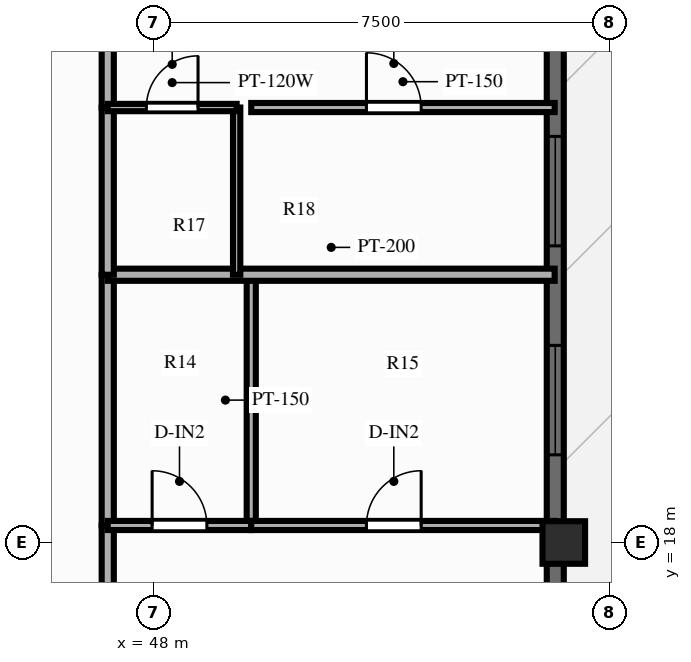
"""IFC4 building model, lengths in metres.
Left out: names, types, materials, properties, quantities, classifications, styles, units other than length and angle.
Written with IfcOpenShell. Run it as: python <this file> out.ifc"""

import sys

from ifc_helpers import new_model, si_unit, direction, frame, frame_2d, origin, origin_2d, place, context, subcontext, project, spatial, rectangle, extrude, source, transform, mapped, element, fill, save


model = new_model("IFC4")
c1 = context("Model", 3, precision=1e-05, world=origin(), true_north=direction((0.0, 1.0)))
c2 = subcontext(c1, "Body", "Model", "MODEL_VIEW")
j1 = project(units=[si_unit("LENGTHUNIT", "METRE"), si_unit("PLANEANGLEUNIT", "RADIAN")], contexts=[c1])
p1 = place(None, origin())
s1 = spatial("IfcSite", under=j1, at=p1, CompositionType="ELEMENT")
p2 = place(p1, origin())
s2 = spatial("IfcBuilding", under=s1, at=p2, CompositionType="ELEMENT")
p3 = place(p2, frame((0.0, 0.0, 226.2)))
s3 = spatial("IfcBuildingStorey", under=s2, at=p3, CompositionType="ELEMENT", Elevation=226.2)
m1 = source(origin(), c2, "Body", "SweptSolid", [
    extrude(rectangle(XDim=0.7, YDim=0.7, at=origin_2d()), origin(), (0.0, 0.0, 1.0), 3.9),
])
p4 = place(p3, frame((54.75, 18.0, 0.0), z_axis=(0.0, 0.0, 1.0), x_axis=(1.0, 0.0, 0.0)))
e1 = element("IfcColumn", 1, at=p4, inside=s3, PredefinedType="COLUMN", context=c2, shape_type="MappedRepresentation", body=[
    mapped(m1, transform((0.0, 0.0, 0.0), scale=1.0)),
])
p5 = place(p3, frame((54.61, 11.5, 0.0), z_axis=(0.0, 0.0, 1.0), x_axis=(0.0, 1.0, 0.0)))
e2 = element("IfcWall", 2, at=p5, inside=s3, PredefinedType="SOLIDWALL", context=c2, shape_type="SweptSolid", body=[
    extrude(rectangle(XDim=31.0, YDim=0.28, at=frame_2d((15.5, 0.0))), origin(), (0.0, 0.0, 1.0), 2.79),
])
p6 = place(p5, frame((0.66, 0.0, 0.85)))
e3 = element("IfcOpeningElement", 3, at=p6, cuts=e2, PredefinedType="OPENING", context=c2, shape_type="SweptSolid", body=[
    extrude(rectangle(XDim=1.8, YDim=1.65, at=frame_2d((0.9, 0.825))), frame((0.0, 0.152, 0.0), z_axis=(0.0, -1.0, 0.0), x_axis=(1.0, 0.0, 0.0)), (0.0, 0.0, 1.0), 0.304),
])
p7 = place(p5, frame((3.72, 0.0, 0.85)))
e4 = element("IfcOpeningElement", 4, at=p7, cuts=e2, PredefinedType="OPENING", context=c2, shape_type="SweptSolid", body=[
    extrude(rectangle(XDim=1.8, YDim=1.65, at=frame_2d((0.9, 0.825))), frame((0.0, 0.152, 0.0), z_axis=(0.0, -1.0, 0.0), x_axis=(1.0, 0.0, 0.0)), (0.0, 0.0, 1.0), 0.304),
])
p8 = place(p5, frame((7.942, 0.0, 0.85)))
e5 = element("IfcOpeningElement", 5, at=p8, cuts=e2, PredefinedType="OPENING", context=c2, shape_type="SweptSolid", body=[
    extrude(rectangle(XDim=1.8, YDim=1.65, at=frame_2d((0.9, 0.825))), frame((0.0, 0.152, 0.0), z_axis=(0.0, -1.0, 0.0), x_axis=(1.0, 0.0, 0.0)), (0.0, 0.0, 1.0), 0.304),
])
p9 = place(p5, frame((11.379, 0.0, 0.85)))
e6 = element("IfcOpeningElement", 6, at=p9, cuts=e2, PredefinedType="OPENING", context=c2, shape_type="SweptSolid", body=[
    extrude(rectangle(XDim=1.8, YDim=1.65, at=frame_2d((0.9, 0.825))), frame((0.0, 0.152, 0.0), z_axis=(0.0, -1.0, 0.0), x_axis=(1.0, 0.0, 0.0)), (0.0, 0.0, 1.0), 0.304),
])
p10 = place(p5, frame((16.213, 0.0, 0.0), z_axis=(0.0, 0.0, 1.0), x_axis=(-1.0, 0.0, 0.0)))
e7 = element("IfcOpeningElement", 7, at=p10, cuts=e2, PredefinedType="OPENING", context=c2, shape_type="SweptSolid", body=[
    extrude(rectangle(XDim=1.6, YDim=2.15, at=frame_2d((0.8, 1.075))), frame((0.0, 0.152, 0.0), z_axis=(0.0, -1.0, 0.0), x_axis=(1.0, 0.0, 0.0)), (0.0, 0.0, 1.0), 0.304),
])
p11 = place(p5, frame((18.194, 0.0, 0.85)))
e8 = element("IfcOpeningElement", 8, at=p11, cuts=e2, PredefinedType="OPENING", context=c2, shape_type="SweptSolid", body=[
    extrude(rectangle(XDim=1.8, YDim=1.65, at=frame_2d((0.9, 0.825))), frame((0.0, 0.152, 0.0), z_axis=(0.0, -1.0, 0.0), x_axis=(1.0, 0.0, 0.0)), (0.0, 0.0, 1.0), 0.304),
])
p12 = place(p5, frame((21.488, 0.0, 0.85)))
e9 = element("IfcOpeningElement", 9, at=p12, cuts=e2, PredefinedType="OPENING", context=c2, shape_type="SweptSolid", body=[
    extrude(rectangle(XDim=1.8, YDim=1.65, at=frame_2d((0.9, 0.825))), frame((0.0, 0.152, 0.0), z_axis=(0.0, -1.0, 0.0), x_axis=(1.0, 0.0, 0.0)), (0.0, 0.0, 1.0), 0.304),
])
p13 = place(p5, frame((25.142, 0.0, 0.85)))
e10 = element("IfcOpeningElement", 10, at=p13, cuts=e2, PredefinedType="OPENING", context=c2, shape_type="SweptSolid", body=[
    extrude(rectangle(XDim=1.5, YDim=1.65, at=frame_2d((0.75, 0.825))), frame((0.0, 0.152, 0.0), z_axis=(0.0, -1.0, 0.0), x_axis=(1.0, 0.0, 0.0)), (0.0, 0.0, 1.0), 0.304),
])
p14 = place(p5, frame((28.052, 0.0, 0.85)))
e11 = element("IfcOpeningElement", 11, at=p14, cuts=e2, PredefinedType="OPENING", context=c2, shape_type="SweptSolid", body=[
    extrude(rectangle(XDim=1.8, YDim=1.65, at=frame_2d((0.9, 0.825))), frame((0.0, 0.152, 0.0), z_axis=(0.0, -1.0, 0.0), x_axis=(1.0, 0.0, 0.0)), (0.0, 0.0, 1.0), 0.304),
])
p15 = place(p3, frame((47.25, 14.43, 0.0), z_axis=(0.0, 0.0, 1.0), x_axis=(0.0, 1.0, 0.0)))
e12 = element("IfcWall", 12, at=p15, inside=s3, PredefinedType="PARTITIONING", context=c2, shape_type="SweptSolid", body=[
    extrude(rectangle(XDim=3.85, YDim=0.2, at=frame_2d((1.925, 0.0))), origin(), (0.0, 0.0, 1.0), 3.69),
])
p16 = place(p15, frame((1.425, 0.0, 0.0)))
e13 = element("IfcOpeningElement", 13, at=p16, cuts=e12, PredefinedType="OPENING", context=c2, shape_type="SweptSolid", body=[
    extrude(rectangle(XDim=1.0, YDim=2.15, at=frame_2d((0.5, 1.075))), frame((0.0, 0.112, 0.0), z_axis=(0.0, -1.0, 0.0), x_axis=(1.0, 0.0, 0.0)), (0.0, 0.0, 1.0), 0.224),
])
p17 = place(p3, frame((47.25, 18.28, 0.0), z_axis=(0.0, 0.0, 1.0), x_axis=(0.0, 1.0, 0.0)))
e14 = element("IfcWall", 14, at=p17, inside=s3, PredefinedType="PARTITIONING", context=c2, shape_type="SweptSolid", body=[
    extrude(rectangle(XDim=4.124, YDim=0.2, at=frame_2d((2.062, 0.0))), origin(), (0.0, 0.0, 1.0), 3.69),
])
p18 = place(p3, frame((49.61, 18.28, 0.0), z_axis=(0.0, 0.0, 1.0), x_axis=(0.0, 1.0, 0.0)))
e15 = element("IfcWall", 15, at=p18, inside=s3, PredefinedType="PARTITIONING", context=c2, shape_type="SweptSolid", body=[
    extrude(rectangle(XDim=4.124, YDim=0.15, at=frame_2d((2.062, 0.0))), origin(), (0.0, 0.0, 1.0), 3.39),
])
p19 = place(p3, frame((47.25, 18.28, 0.0), z_axis=(0.0, 0.0, 1.0), x_axis=(1.0, 0.0, 0.0)))
e16 = element("IfcWall", 16, at=p19, inside=s3, PredefinedType="PARTITIONING", context=c2, shape_type="SweptSolid", body=[
    extrude(rectangle(XDim=2.36, YDim=0.15, at=frame_2d((1.18, 0.0))), origin(), (0.0, 0.0, 1.0), 3.69),
])
p20 = place(p19, frame((0.73, 0.0, 0.0)))
e17 = element("IfcOpeningElement", 17, at=p20, cuts=e16, PredefinedType="OPENING", context=c2, shape_type="SweptSolid", body=[
    extrude(rectangle(XDim=0.9, YDim=2.1, at=frame_2d((0.45, 1.05))), frame((0.0, 0.087, 0.0), z_axis=(0.0, -1.0, 0.0), x_axis=(1.0, 0.0, 0.0)), (0.0, 0.0, 1.0), 0.174),
])
p21 = place(p3, frame((49.61, 18.28, 0.0), z_axis=(0.0, 0.0, 1.0), x_axis=(1.0, 0.0, 0.0)))
e18 = element("IfcWall", 18, at=p21, inside=s3, PredefinedType="PARTITIONING", context=c2, shape_type="SweptSolid", body=[
    extrude(rectangle(XDim=4.99, YDim=0.15, at=frame_2d((2.495, 0.0))), origin(), (0.0, 0.0, 1.0), 3.69),
])
p22 = place(p21, frame((1.895, 0.0, 0.0)))
e19 = element("IfcOpeningElement", 19, at=p22, cuts=e18, PredefinedType="OPENING", context=c2, shape_type="SweptSolid", body=[
    extrude(rectangle(XDim=0.9, YDim=2.1, at=frame_2d((0.45, 1.05))), frame((0.0, 0.087, 0.0), z_axis=(0.0, -1.0, 0.0), x_axis=(1.0, 0.0, 0.0)), (0.0, 0.0, 1.0), 0.174),
])
p23 = place(p3, frame((47.25, 22.404, 0.0), z_axis=(0.0, 0.0, 1.0), x_axis=(1.0, 0.0, 0.0)))
e20 = element("IfcWall", 20, at=p23, inside=s3, PredefinedType="PARTITIONING", context=c2, shape_type="SweptSolid", body=[
    extrude(rectangle(XDim=7.35, YDim=0.2, at=frame_2d((3.675, 0.0))), origin(), (0.0, 0.0, 1.0), 3.29),
])
p24 = place(p3, frame((47.25, 22.404, 0.0), z_axis=(0.0, 0.0, 1.0), x_axis=(0.0, 1.0, 0.0)))
e21 = element("IfcWall", 21, at=p24, inside=s3, PredefinedType="PARTITIONING", context=c2, shape_type="SweptSolid", body=[
    extrude(rectangle(XDim=2.75, YDim=0.2, at=frame_2d((1.375, 0.0))), origin(), (0.0, 0.0, 1.0), 3.69),
])
p25 = place(p3, frame((47.25, 25.154, 0.0), z_axis=(0.0, 0.0, 1.0), x_axis=(0.0, 1.0, 0.0)))
e22 = element("IfcWall", 22, at=p25, inside=s3, PredefinedType="PARTITIONING", context=c2, shape_type="SweptSolid", body=[
    extrude(rectangle(XDim=3.519, YDim=0.2, at=frame_2d((1.759, 0.0))), origin(), (0.0, 0.0, 1.0), 3.69),
])
p26 = place(p25, frame((1.26, 0.0, 0.0)))
e23 = element("IfcOpeningElement", 23, at=p26, cuts=e22, PredefinedType="OPENING", context=c2, shape_type="SweptSolid", body=[
    extrude(rectangle(XDim=1.0, YDim=2.15, at=frame_2d((0.5, 1.075))), frame((0.0, 0.112, 0.0), z_axis=(0.0, -1.0, 0.0), x_axis=(1.0, 0.0, 0.0)), (0.0, 0.0, 1.0), 0.224),
])
p27 = place(p3, frame((49.37, 22.404, 0.0), z_axis=(0.0, 0.0, 1.0), x_axis=(0.0, 1.0, 0.0)))
e24 = element("IfcWall", 24, at=p27, inside=s3, PredefinedType="PARTITIONING", context=c2, shape_type="SweptSolid", body=[
    extrude(rectangle(XDim=2.75, YDim=0.12, at=frame_2d((1.375, 0.0))), origin(), (0.0, 0.0, 1.0), 3.39),
])
p28 = place(p3, frame((47.25, 25.154, 0.0), z_axis=(0.0, 0.0, 1.0), x_axis=(1.0, 0.0, 0.0)))
e25 = element("IfcWall", 25, at=p28, inside=s3, PredefinedType="PARTITIONING", context=c2, shape_type="SweptSolid", body=[
    extrude(rectangle(XDim=2.12, YDim=0.12, at=frame_2d((1.06, 0.0))), origin(), (0.0, 0.0, 1.0), 3.69),
])
p29 = place(p28, frame((0.635, 0.0, 0.0)))
e26 = element("IfcOpeningElement", 26, at=p29, cuts=e25, PredefinedType="OPENING", context=c2, shape_type="SweptSolid", body=[
    extrude(rectangle(XDim=0.85, YDim=2.05, at=frame_2d((0.425, 1.025))), frame((0.0, 0.072, 0.0), z_axis=(0.0, -1.0, 0.0), x_axis=(1.0, 0.0, 0.0)), (0.0, 0.0, 1.0), 0.144),
])
p30 = place(p3, frame((49.61, 25.154, 0.0), z_axis=(0.0, 0.0, 1.0), x_axis=(1.0, 0.0, 0.0)))
e27 = element("IfcWall", 27, at=p30, inside=s3, PredefinedType="PARTITIONING", context=c2, shape_type="SweptSolid", body=[
    extrude(rectangle(XDim=4.99, YDim=0.15, at=frame_2d((2.495, 0.0))), origin(), (0.0, 0.0, 1.0), 3.69),
])
p31 = place(p30, frame((1.895, 0.0, 0.0)))
e28 = element("IfcOpeningElement", 28, at=p31, cuts=e27, PredefinedType="OPENING", context=c2, shape_type="SweptSolid", body=[
    extrude(rectangle(XDim=0.9, YDim=2.1, at=frame_2d((0.45, 1.05))), frame((0.0, 0.087, 0.0), z_axis=(0.0, -1.0, 0.0), x_axis=(1.0, 0.0, 0.0)), (0.0, 0.0, 1.0), 0.174),
])
m2 = source(origin(), c2, "Body", "SweptSolid", [
    extrude(rectangle(XDim=1.8, YDim=1.65, at=frame_2d((0.9, 0.825))), frame((0.0, 0.03, 0.0), z_axis=(0.0, -1.0, 0.0), x_axis=(1.0, 0.0, 0.0)), (0.0, 0.0, 1.0), 0.06),
])
p32 = place(p8, origin())
e29 = element("IfcWindow", 29, at=p32, inside=s3, PartitioningType="SINGLE_PANEL", PredefinedType="WINDOW", context=c2, shape_type="MappedRepresentation", body=[
    mapped(m2, transform((0.0, 0.0, 0.0), scale=1.0)),
])
fill(e5, e29)
p33 = place(p9, origin())
e30 = element("IfcWindow", 30, at=p33, inside=s3, PartitioningType="SINGLE_PANEL", PredefinedType="WINDOW", context=c2, shape_type="MappedRepresentation", body=[
    mapped(m2, transform((0.0, 0.0, 0.0), scale=1.0)),
])
fill(e6, e30)
m3 = source(origin(), c2, "Body", "SweptSolid", [
    extrude(rectangle(XDim=0.9, YDim=2.1, at=frame_2d((0.45, 1.05))), frame((0.0, 0.025, 0.0), z_axis=(0.0, -1.0, 0.0), x_axis=(1.0, 0.0, 0.0)), (0.0, 0.0, 1.0), 0.05),
])
p34 = place(p20, origin())
e31 = element("IfcDoor", 31, at=p34, inside=s3, OperationType="SINGLE_SWING_LEFT", PredefinedType="DOOR", context=c2, shape_type="MappedRepresentation", body=[
    mapped(m3, transform((0.0, 0.0, 0.0), scale=1.0)),
])
fill(e17, e31)
p35 = place(p22, origin())
e32 = element("IfcDoor", 32, at=p35, inside=s3, OperationType="SINGLE_SWING_RIGHT", PredefinedType="DOOR", context=c2, shape_type="MappedRepresentation", body=[
    mapped(m3, transform((0.0, 0.0, 0.0), scale=1.0)),
])
fill(e19, e32)
m4 = source(origin(), c2, "Body", "SweptSolid", [
    extrude(rectangle(XDim=0.85, YDim=2.05, at=frame_2d((0.425, 1.025))), frame((0.0, 0.025, 0.0), z_axis=(0.0, -1.0, 0.0), x_axis=(1.0, 0.0, 0.0)), (0.0, 0.0, 1.0), 0.05),
])
p36 = place(p29, origin())
e33 = element("IfcDoor", 33, at=p36, inside=s3, OperationType="SINGLE_SWING_RIGHT", PredefinedType="DOOR", context=c2, shape_type="MappedRepresentation", body=[
    mapped(m4, transform((0.0, 0.0, 0.0), scale=1.0)),
])
fill(e26, e33)
p37 = place(p31, origin())
e34 = element("IfcDoor", 34, at=p37, inside=s3, OperationType="SINGLE_SWING_LEFT", PredefinedType="DOOR", context=c2, shape_type="MappedRepresentation", body=[
    mapped(m3, transform((0.0, 0.0, 0.0), scale=1.0)),
])
fill(e28, e34)
save(model, sys.argv[1])
